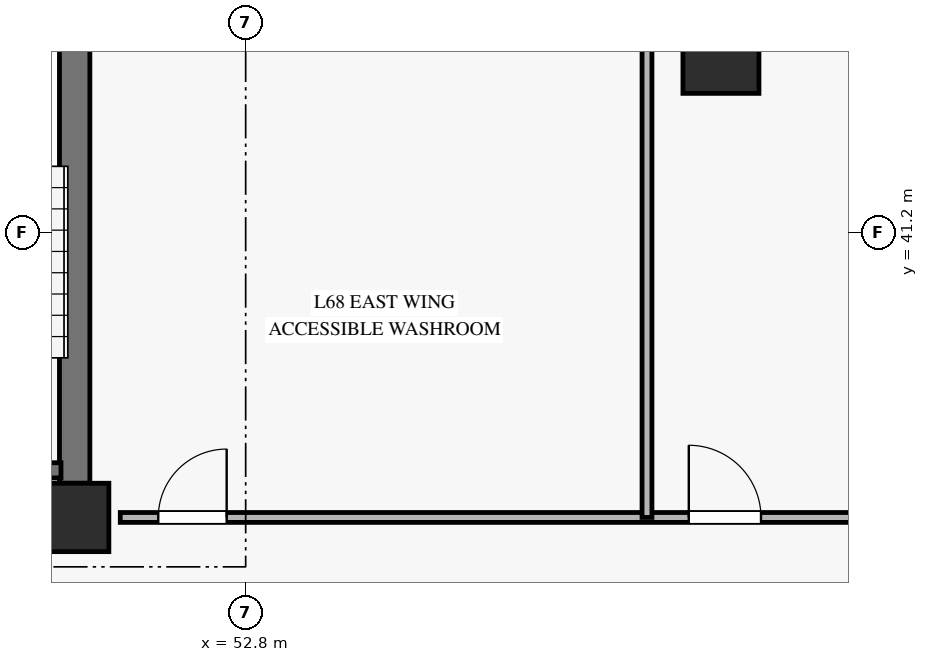
"""IFC4 building model, lengths in metres.
Left out: names, types, materials, properties, quantities, classifications, styles, units other than length and angle.
Written with IfcOpenShell. Run it as: python <this file> out.ifc"""

import sys

from ifc_helpers import new_model, si_unit, direction, frame, frame_2d, origin, origin_2d, place, context, subcontext, project, spatial, rectangle, hollow_rectangle, extrude, source, transform, mapped, element, fill, save


model = new_model("IFC4")
c1 = context("Model", 3, precision=1e-05, world=origin(), true_north=direction((0.0, 1.0)))
c2 = subcontext(c1, "Body", "Model", "MODEL_VIEW")
j1 = project(units=[si_unit("LENGTHUNIT", "METRE"), si_unit("PLANEANGLEUNIT", "RADIAN")], contexts=[c1])
p1 = place(None, origin())
s1 = spatial("IfcSite", under=j1, at=p1, CompositionType="ELEMENT")
p2 = place(p1, origin())
s2 = spatial("IfcBuilding", under=s1, at=p2, CompositionType="ELEMENT")
p3 = place(p2, frame((0.0, 0.0, 265.5)))
s3 = spatial("IfcBuildingStorey", under=s2, at=p3, CompositionType="ELEMENT", Elevation=265.5)
m1 = source(origin(), c2, "Body", "SweptSolid", [
    extrude(rectangle(XDim=0.9, YDim=0.9, at=origin_2d()), origin(), (0.0, 0.0, 1.0), 3.185),
])
p4 = place(p3, frame((50.55, 37.45, 0.0), z_axis=(0.0, 0.0, 1.0), x_axis=(1.0, 0.0, 0.0)))
e1 = element("IfcColumn", 1, at=p4, inside=s3, PredefinedType="PILASTER", context=c2, shape_type="MappedRepresentation", body=[
    mapped(m1, transform((0.0, 0.0, 0.0), x_axis=(1.0, 0.0, 0.0), y_axis=(0.0, 1.0, 0.0), z_axis=(0.0, 0.0, 1.0), scale=1.0)),
])
p5 = place(p3, frame((50.55, 37.9, 0.0), z_axis=(0.0, 0.0, 1.0), x_axis=(0.0, 1.0, 0.0)))
e2 = element("IfcWall", 2, at=p5, inside=s3, PredefinedType="SHEAR", context=c2, shape_type="SweptSolid", body=[
    extrude(rectangle(XDim=8.2, YDim=0.4, at=frame_2d((4.1, 0.0))), origin(), (0.0, 0.0, 1.0), 3.185),
])
m2 = source(origin(), c2, "Body", "SweptSolid", [
    extrude(hollow_rectangle(XDim=1.0, YDim=1.0, WallThickness=0.045, at=origin_2d()), origin(), (0.0, 0.0, 1.0), 3.207),
])
p6 = place(p3, frame((59.053, 43.53, 0.0), z_axis=(-0.115039538248, 0.014617863232, 0.993253352732), x_axis=(-0.12605458305, -0.992023307232, 0.0)))
e3 = element("IfcColumn", 3, at=p6, inside=s3, PredefinedType="COLUMN", context=c2, shape_type="MappedRepresentation", body=[
    mapped(m2, transform((0.0, 0.0, 0.0), x_axis=(1.0, 0.0, 0.0), y_axis=(0.0, 1.0, 0.0), z_axis=(0.0, 0.0, 1.0), scale=1.0)),
])
p7 = place(p3, frame((61.622, 43.53, 0.0), z_axis=(0.0, 0.0, 1.0), x_axis=(-0.719645186047, 0.694341995129, 0.0)))
e4 = element("IfcWall", 4, at=p7, inside=s3, PredefinedType="SOLIDWALL", context=c2, shape_type="SweptSolid", body=[
    extrude(rectangle(XDim=3.917, YDim=0.3, at=frame_2d((1.958, 0.0))), origin(), (0.0, 0.0, 1.0), 2.815),
])
p8 = place(p7, frame((1.159, 0.0, 0.45)))
e5 = element("IfcOpeningElement", 5, at=p8, cuts=e4, PredefinedType="OPENING", context=c2, shape_type="SweptSolid", body=[
    extrude(rectangle(XDim=1.6, YDim=2.0, at=frame_2d((0.8, 1.0))), frame((0.0, 0.16, 0.0), z_axis=(0.0, -1.0, 0.0), x_axis=(1.0, 0.0, 0.0)), (0.0, 0.0, 1.0), 0.32),
])
p9 = place(p3, frame((47.44, 38.07, 0.0), z_axis=(0.0, 0.0, 1.0), x_axis=(1.0, 0.0, 0.0)))
e6 = element("IfcWall", 6, at=p9, inside=s3, PredefinedType="SOLIDWALL", context=c2, shape_type="SweptSolid", body=[
    extrude(rectangle(XDim=2.93, YDim=0.2, at=frame_2d((1.465, 0.0))), origin(), (0.0, 0.0, 1.0), 3.4),
])
p10 = place(p3, frame((51.15, 37.45, 0.0), z_axis=(0.0, 0.0, 1.0), x_axis=(1.0, 0.0, 0.0)))
e7 = element("IfcWall", 7, at=p10, inside=s3, PredefinedType="PARTITIONING", context=c2, shape_type="SweptSolid", body=[
    extrude(rectangle(XDim=10.472, YDim=0.13, at=frame_2d((5.236, 0.0))), origin(), (0.0, 0.0, 1.0), 2.82),
])
p11 = place(p10, frame((0.5, 0.0, 0.0)))
e8 = element("IfcOpeningElement", 8, at=p11, cuts=e7, PredefinedType="OPENING", context=c2, shape_type="SweptSolid", body=[
    extrude(rectangle(XDim=0.9, YDim=2.1, at=frame_2d((0.45, 1.05))), frame((0.0, 0.075, 0.0), z_axis=(0.0, -1.0, 0.0), x_axis=(1.0, 0.0, 0.0)), (0.0, 0.0, 1.0), 0.15),
])
p12 = place(p10, frame((7.48, 0.0, 0.0)))
e9 = element("IfcOpeningElement", 9, at=p12, cuts=e7, PredefinedType="OPENING", context=c2, shape_type="SweptSolid", body=[
    extrude(rectangle(XDim=0.95, YDim=2.1, at=frame_2d((0.475, 1.05))), frame((0.0, 0.075, 0.0), z_axis=(0.0, -1.0, 0.0), x_axis=(1.0, 0.0, 0.0)), (0.0, 0.0, 1.0), 0.15),
])
p13 = place(p3, frame((58.08, 37.45, 0.0), z_axis=(0.0, 0.0, 1.0), x_axis=(0.0, 1.0, 0.0)))
e10 = element("IfcWall", 10, at=p13, inside=s3, PredefinedType="PARTITIONING", context=c2, shape_type="SweptSolid", body=[
    extrude(rectangle(XDim=8.8, YDim=0.13, at=frame_2d((4.4, 0.0))), origin(), (0.0, 0.0, 1.0), 3.185),
])
m3 = source(origin(), c2, "Body", "SweptSolid", [
    extrude(rectangle(XDim=0.9, YDim=2.1, at=frame_2d((0.45, 1.05))), frame((0.0, 0.025, 0.0), z_axis=(0.0, -1.0, 0.0), x_axis=(1.0, 0.0, 0.0)), (0.0, 0.0, 1.0), 0.05),
])
p14 = place(p11, origin())
e11 = element("IfcDoor", 11, at=p14, inside=s3, OperationType="SINGLE_SWING_RIGHT", PredefinedType="DOOR", context=c2, shape_type="MappedRepresentation", body=[
    mapped(m3, transform((0.0, 0.0, 0.0), x_axis=(1.0, 0.0, 0.0), y_axis=(0.0, 1.0, 0.0), z_axis=(0.0, 0.0, 1.0), scale=1.0)),
])
fill(e8, e11)
m4 = source(origin(), c2, "Body", "SweptSolid", [
    extrude(rectangle(XDim=0.95, YDim=2.1, at=frame_2d((0.475, 1.05))), frame((0.0, 0.025, 0.0), z_axis=(0.0, -1.0, 0.0), x_axis=(1.0, 0.0, 0.0)), (0.0, 0.0, 1.0), 0.05),
])
p15 = place(p12, origin())
e12 = element("IfcDoor", 12, at=p15, inside=s3, OperationType="SINGLE_SWING_LEFT", PredefinedType="DOOR", context=c2, shape_type="MappedRepresentation", body=[
    mapped(m4, transform((0.0, 0.0, 0.0), x_axis=(1.0, 0.0, 0.0), y_axis=(0.0, 1.0, 0.0), z_axis=(0.0, 0.0, 1.0), scale=1.0)),
])
fill(e9, e12)
save(model, sys.argv[1])
